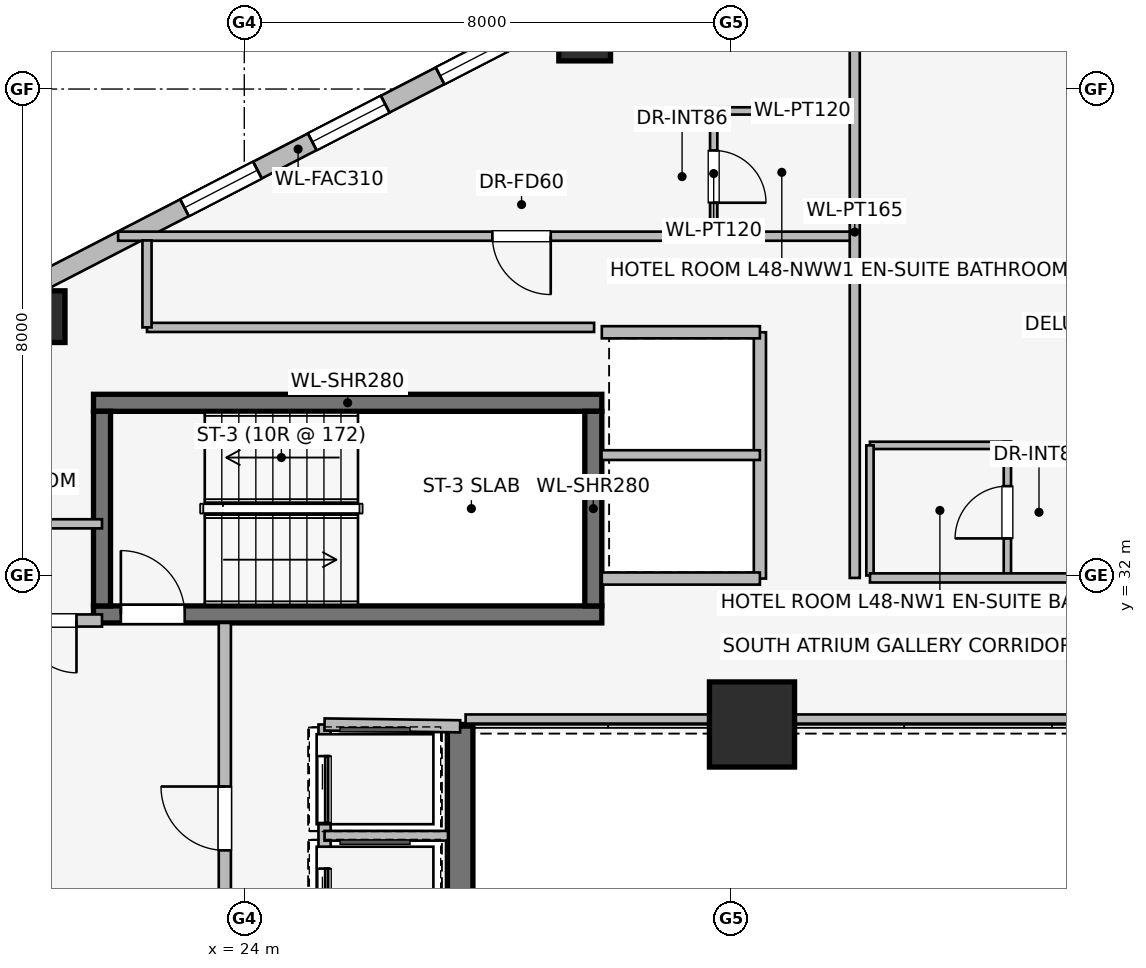
"""IFC4 building model, lengths in metres.
Left out: names, types, materials, properties, quantities, classifications, styles, units other than length and angle.
Written with IfcOpenShell. Run it as: python <this file> out.ifc"""

import sys

from ifc_helpers import new_model, si_unit, direction, frame, frame_2d, origin, origin_2d, place, context, subcontext, project, spatial, rectangle, extrude, element, fill, save


model = new_model("IFC4")
c1 = context("Model", 3, precision=1e-05, world=origin(), true_north=direction((0.0, 1.0)))
c2 = subcontext(c1, "Body", "Model", "MODEL_VIEW")
j1 = project(units=[si_unit("LENGTHUNIT", "METRE"), si_unit("PLANEANGLEUNIT", "RADIAN")], contexts=[c1])
p1 = place(None, origin())
s1 = spatial("IfcSite", under=j1, at=p1, CompositionType="ELEMENT")
p2 = place(p1, origin())
s2 = spatial("IfcBuilding", under=s1, at=p2, CompositionType="ELEMENT")
p3 = place(p2, frame((0.0, 0.0, 177.45)))
s3 = spatial("IfcBuildingStorey", under=s2, at=p3, CompositionType="ELEMENT", Elevation=177.45)
p4 = place(p3, frame((27.55, 29.55, 0.0), z_axis=(0.0, 0.0, 1.0), x_axis=(0.0, -1.0, 0.0)))
e1 = element("IfcWall", 1, at=p4, inside=s3, PredefinedType="SHEAR", context=c2, shape_type="SweptSolid", body=[
    extrude(rectangle(XDim=11.25, YDim=0.42, at=frame_2d((5.625, 0.0))), origin(), (0.0, 0.0, 1.0), 3.45),
])
p5 = place(p3, frame((21.52, 31.36, 0.0), z_axis=(0.0, 0.0, 1.0), x_axis=(1.0, 0.0, 0.0)))
e2 = element("IfcWall", 2, at=p5, inside=s3, PredefinedType="SHEAR", context=c2, shape_type="SweptSolid", body=[
    extrude(rectangle(XDim=8.36, YDim=0.28, at=frame_2d((4.18, 0.0))), origin(), (0.0, 0.0, 1.0), 3.45),
])
p6 = place(p5, frame((0.45, 0.0, 0.0)))
e3 = element("IfcOpeningElement", 3, at=p6, cuts=e2, PredefinedType="OPENING", context=c2, shape_type="SweptSolid", body=[
    extrude(rectangle(XDim=1.05, YDim=2.0, at=frame_2d((0.525, 1.0))), frame((0.0, 0.15, 0.0), z_axis=(0.0, -1.0, 0.0), x_axis=(1.0, 0.0, 0.0)), (0.0, 0.0, 1.0), 0.3),
])
p7 = place(p3, frame((29.88, 34.84, 0.0), z_axis=(0.0, 0.0, 1.0), x_axis=(-1.0, 0.0, 0.0)))
e4 = element("IfcWall", 4, at=p7, inside=s3, PredefinedType="SHEAR", context=c2, shape_type="SweptSolid", body=[
    extrude(rectangle(XDim=8.36, YDim=0.28, at=frame_2d((4.18, 0.0))), origin(), (0.0, 0.0, 1.0), 3.45),
])
for number, where, z_axis, x_axis in (
    (5, (21.66, 34.7, 0.0), (0.0, 0.0, 1.0), (0.0, -1.0, 0.0)),
    (6, (29.74, 31.5, 0.0), (0.0, 0.0, 1.0), (0.0, 1.0, 0.0)),
):
    element("IfcWall", number, at=place(p3, frame(where, z_axis=z_axis, x_axis=x_axis)), inside=s3, PredefinedType="SHEAR", context=c2, shape_type="SweptSolid", body=[
        extrude(rectangle(XDim=3.2, YDim=0.28, at=frame_2d((1.6, 0.0))), origin(), (0.0, 0.0, 1.0), 3.45),
    ])
p8 = place(p3, frame((32.35, 29.55, 0.0), z_axis=(0.0, 0.0, 1.0), x_axis=(1.0, 0.0, 0.0)))
e7 = element("IfcColumn", 7, at=p8, inside=s3, PredefinedType="COLUMN", context=c2, shape_type="SweptSolid", body=[
    extrude(rectangle(XDim=1.4, YDim=1.4, at=origin_2d()), origin(), (0.0, 0.0, 1.0), 3.45),
])
for number, where, z_axis, x_axis in (
    (8, (29.598, 40.888, 0.0), (0.0, 0.0, 1.0), (1.0, 0.0, 0.0)),
    (9, (20.626, 36.257, 0.0), (0.0, 0.0, 1.0), (1.0, 0.0, 0.0)),
):
    element("IfcColumn", number, at=place(p3, frame(where, z_axis=z_axis, x_axis=x_axis)), inside=s3, PredefinedType="COLUMN", context=c2, shape_type="SweptSolid", body=[
        extrude(rectangle(XDim=0.85, YDim=0.85, at=origin_2d()), origin(), (0.0, 0.0, 1.0), 3.45),
    ])
p9 = place(p3, frame((36.838, 42.871, 0.0), z_axis=(0.0, 0.0, 1.0), x_axis=(0.888626188278, -0.458632202867, 0.0)))
e10 = element("IfcWall", 10, at=p9, inside=s3, PredefinedType="STANDARD", context=c2, shape_type="SweptSolid", body=[
    extrude(rectangle(XDim=16.828, YDim=0.31, at=frame_2d((8.414, 0.0))), origin(), (0.0, 0.0, 1.0), 3.16),
])
p10 = place(p9, frame((0.675, 0.0, 0.75)))
e11 = element("IfcOpeningElement", 11, at=p10, cuts=e10, PredefinedType="OPENING", context=c2, shape_type="SweptSolid", body=[
    extrude(rectangle(XDim=2.0, YDim=1.5, at=frame_2d((1.0, 0.75))), frame((0.0, 0.165, 0.0), z_axis=(0.0, -1.0, 0.0), x_axis=(1.0, 0.0, 0.0)), (0.0, 0.0, 1.0), 0.33),
])
p11 = place(p9, frame((4.196, 0.0, 0.75)))
e12 = element("IfcOpeningElement", 12, at=p11, cuts=e10, PredefinedType="OPENING", context=c2, shape_type="SweptSolid", body=[
    extrude(rectangle(XDim=1.35, YDim=1.45, at=frame_2d((0.675, 0.725))), frame((0.0, 0.165, 0.0), z_axis=(0.0, -1.0, 0.0), x_axis=(1.0, 0.0, 0.0)), (0.0, 0.0, 1.0), 0.33),
])
p12 = place(p9, frame((6.078, 0.0, 0.75)))
e13 = element("IfcOpeningElement", 13, at=p12, cuts=e10, PredefinedType="OPENING", context=c2, shape_type="SweptSolid", body=[
    extrude(rectangle(XDim=1.35, YDim=1.45, at=frame_2d((0.675, 0.725))), frame((0.0, 0.165, 0.0), z_axis=(0.0, -1.0, 0.0), x_axis=(1.0, 0.0, 0.0)), (0.0, 0.0, 1.0), 0.33),
])
p13 = place(p9, frame((9.658, 0.0, 0.75)))
e14 = element("IfcOpeningElement", 14, at=p13, cuts=e10, PredefinedType="OPENING", context=c2, shape_type="SweptSolid", body=[
    extrude(rectangle(XDim=2.0, YDim=1.5, at=frame_2d((1.0, 0.75))), frame((0.0, 0.165, 0.0), z_axis=(0.0, -1.0, 0.0), x_axis=(1.0, 0.0, 0.0)), (0.0, 0.0, 1.0), 0.33),
])
p14 = place(p9, frame((14.478, 0.0, 0.75)))
e15 = element("IfcOpeningElement", 15, at=p14, cuts=e10, PredefinedType="OPENING", context=c2, shape_type="SweptSolid", body=[
    extrude(rectangle(XDim=1.35, YDim=1.45, at=frame_2d((0.675, 0.725))), frame((0.0, 0.165, 0.0), z_axis=(0.0, -1.0, 0.0), x_axis=(1.0, 0.0, 0.0)), (0.0, 0.0, 1.0), 0.33),
])
p15 = place(p3, frame((17.408, 35.153, 0.0), z_axis=(0.0, 0.0, 1.0), x_axis=(0.888626188278, 0.458632202867, 0.0)))
e16 = element("IfcWall", 16, at=p15, inside=s3, PredefinedType="STANDARD", context=c2, shape_type="SweptSolid", body=[
    extrude(rectangle(XDim=16.828, YDim=0.31, at=frame_2d((8.414, 0.0))), origin(), (0.0, 0.0, 1.0), 3.16),
])
p16 = place(p15, frame((0.675, 0.0, 0.75)))
e17 = element("IfcOpeningElement", 17, at=p16, cuts=e16, PredefinedType="OPENING", context=c2, shape_type="SweptSolid", body=[
    extrude(rectangle(XDim=2.0, YDim=1.5, at=frame_2d((1.0, 0.75))), frame((0.0, 0.165, 0.0), z_axis=(0.0, -1.0, 0.0), x_axis=(1.0, 0.0, 0.0)), (0.0, 0.0, 1.0), 0.33),
])
p17 = place(p15, frame((6.312, 0.0, 0.75)))
e18 = element("IfcOpeningElement", 18, at=p17, cuts=e16, PredefinedType="OPENING", context=c2, shape_type="SweptSolid", body=[
    extrude(rectangle(XDim=1.35, YDim=1.45, at=frame_2d((0.675, 0.725))), frame((0.0, 0.165, 0.0), z_axis=(0.0, -1.0, 0.0), x_axis=(1.0, 0.0, 0.0)), (0.0, 0.0, 1.0), 0.33),
])
p18 = place(p15, frame((8.676, 0.0, 0.75)))
e19 = element("IfcOpeningElement", 19, at=p18, cuts=e16, PredefinedType="OPENING", context=c2, shape_type="SweptSolid", body=[
    extrude(rectangle(XDim=1.35, YDim=1.45, at=frame_2d((0.675, 0.725))), frame((0.0, 0.165, 0.0), z_axis=(0.0, -1.0, 0.0), x_axis=(1.0, 0.0, 0.0)), (0.0, 0.0, 1.0), 0.33),
])
p19 = place(p15, frame((11.041, 0.0, 0.75)))
e20 = element("IfcOpeningElement", 20, at=p19, cuts=e16, PredefinedType="OPENING", context=c2, shape_type="SweptSolid", body=[
    extrude(rectangle(XDim=1.35, YDim=1.45, at=frame_2d((0.675, 0.725))), frame((0.0, 0.165, 0.0), z_axis=(0.0, -1.0, 0.0), x_axis=(1.0, 0.0, 0.0)), (0.0, 0.0, 1.0), 0.33),
])
p20 = place(p15, frame((14.153, 0.0, 0.75)))
e21 = element("IfcOpeningElement", 21, at=p20, cuts=e16, PredefinedType="OPENING", context=c2, shape_type="SweptSolid", body=[
    extrude(rectangle(XDim=2.0, YDim=1.5, at=frame_2d((1.0, 0.75))), frame((0.0, 0.165, 0.0), z_axis=(0.0, -1.0, 0.0), x_axis=(1.0, 0.0, 0.0)), (0.0, 0.0, 1.0), 0.33),
])
p21 = place(p3, frame((23.68, 25.68, 0.0), z_axis=(0.0, 0.0, 1.0), x_axis=(0.0, 1.0, 0.0)))
e22 = element("IfcWall", 22, at=p21, inside=s3, PredefinedType="PARTITIONING", context=c2, shape_type="SweptSolid", body=[
    extrude(rectangle(XDim=5.54, YDim=0.2, at=frame_2d((2.77, 0.0))), origin(), (0.0, 0.0, 1.0), 3.16),
])
p22 = place(p21, frame((1.8, 0.0, 0.0)))
e23 = element("IfcOpeningElement", 23, at=p22, cuts=e22, PredefinedType="OPENING", context=c2, shape_type="SweptSolid", body=[
    extrude(rectangle(XDim=1.05, YDim=2.0, at=frame_2d((0.525, 1.0))), frame((0.0, 0.11, 0.0), z_axis=(0.0, -1.0, 0.0), x_axis=(1.0, 0.0, 0.0)), (0.0, 0.0, 1.0), 0.22),
])
p23 = place(p3, frame((21.66, 31.26, 0.0), z_axis=(0.0, 0.0, 1.0), x_axis=(-1.0, 0.0, 0.0)))
e24 = element("IfcWall", 24, at=p23, inside=s3, PredefinedType="PARTITIONING", context=c2, shape_type="SweptSolid", body=[
    extrude(rectangle(XDim=2.01, YDim=0.2, at=frame_2d((1.005, 0.0))), origin(), (0.0, 0.0, 1.0), 3.16),
])
p24 = place(p23, frame((0.42, 0.0, 0.0)))
e25 = element("IfcOpeningElement", 25, at=p24, cuts=e24, PredefinedType="OPENING", context=c2, shape_type="SweptSolid", body=[
    extrude(rectangle(XDim=0.86, YDim=2.0, at=frame_2d((0.43, 1.0))), frame((0.0, 0.11, 0.0), z_axis=(0.0, -1.0, 0.0), x_axis=(1.0, 0.0, 0.0)), (0.0, 0.0, 1.0), 0.22),
])
p25 = place(p3, frame((32.48, 31.95, 0.0), z_axis=(0.0, 0.0, 1.0), x_axis=(0.0, 1.0, 0.0)))
e26 = element("IfcWall", 26, at=p25, inside=s3, PredefinedType="PARTITIONING", context=c2, shape_type="SweptSolid", body=[
    extrude(rectangle(XDim=4.05, YDim=0.2, at=frame_2d((2.025, 0.0))), origin(), (0.0, 0.0, 1.0), 3.16),
])
for number, where, z_axis, x_axis in (
    (27, (29.88, 36.0, 0.0), (0.0, 0.0, 1.0), (1.0, 0.0, 0.0)),
    (28, (32.48, 31.95, 0.0), (0.0, 0.0, 1.0), (-1.0, 0.0, 0.0)),
):
    element("IfcWall", number, at=place(p3, frame(where, z_axis=z_axis, x_axis=x_axis)), inside=s3, PredefinedType="PARTITIONING", context=c2, shape_type="SweptSolid", body=[
        extrude(rectangle(XDim=2.6, YDim=0.2, at=frame_2d((1.3, 0.0))), origin(), (0.0, 0.0, 1.0), 3.16),
    ])
p26 = place(p3, frame((29.875, 33.98, 0.0), z_axis=(0.0, 0.0, 1.0), x_axis=(1.0, 0.0, 0.0)))
e29 = element("IfcWall", 29, at=p26, inside=s3, PredefinedType="PARTITIONING", context=c2, shape_type="SweptSolid", body=[
    extrude(rectangle(XDim=2.605, YDim=0.16, at=frame_2d((1.302, 0.0))), origin(), (0.0, 0.0, 1.0), 3.16),
])
p27 = place(p3, frame((25.32, 29.55, 0.0), z_axis=(0.0, 0.0, 1.0), x_axis=(0.0, -1.0, 0.0)))
e30 = element("IfcWall", 30, at=p27, inside=s3, PredefinedType="PARTITIONING", context=c2, shape_type="SweptSolid", body=[
    extrude(rectangle(XDim=5.53, YDim=0.2, at=frame_2d((2.765, 0.0))), origin(), (0.0, 0.0, 1.0), 3.16),
])
p28 = place(p27, frame((0.52, 0.0, 0.0)))
e31 = element("IfcOpeningElement", 31, at=p28, cuts=e30, PredefinedType="OPENING", context=c2, shape_type="SweptSolid", body=[
    extrude(rectangle(XDim=1.1, YDim=2.2, at=frame_2d((0.55, 1.1))), frame((0.0, 0.11, 0.0), z_axis=(0.0, -1.0, 0.0), x_axis=(1.0, 0.0, 0.0)), (0.0, 0.0, 1.0), 0.22),
])
p29 = place(p27, frame((2.37, 0.0, 0.0)))
e32 = element("IfcOpeningElement", 32, at=p29, cuts=e30, PredefinedType="OPENING", context=c2, shape_type="SweptSolid", body=[
    extrude(rectangle(XDim=1.1, YDim=2.2, at=frame_2d((0.55, 1.1))), frame((0.0, 0.11, 0.0), z_axis=(0.0, -1.0, 0.0), x_axis=(1.0, 0.0, 0.0)), (0.0, 0.0, 1.0), 0.22),
])
p30 = place(p27, frame((4.07, 0.0, 0.0)))
e33 = element("IfcOpeningElement", 33, at=p30, cuts=e30, PredefinedType="OPENING", context=c2, shape_type="SweptSolid", body=[
    extrude(rectangle(XDim=1.1, YDim=2.2, at=frame_2d((0.55, 1.1))), frame((0.0, 0.11, 0.0), z_axis=(0.0, -1.0, 0.0), x_axis=(1.0, 0.0, 0.0)), (0.0, 0.0, 1.0), 0.22),
])
p31 = place(p3, frame((27.55, 29.52, 0.0), z_axis=(0.0, 0.0, 1.0), x_axis=(-0.999909343457, 0.013464949556, 0.0)))
e34 = element("IfcWall", 34, at=p31, inside=s3, PredefinedType="PARTITIONING", context=c2, shape_type="SweptSolid", body=[
    extrude(rectangle(XDim=2.23, YDim=0.2, at=frame_2d((1.115, 0.0))), origin(), (0.0, 0.0, 1.0), 2.06),
])
p32 = place(p3, frame((25.32, 27.72, 0.0), z_axis=(0.0, 0.0, 1.0), x_axis=(1.0, 0.0, 0.0)))
e35 = element("IfcWall", 35, at=p32, inside=s3, PredefinedType="PARTITIONING", context=c2, shape_type="SweptSolid", body=[
    extrude(rectangle(XDim=2.03, YDim=0.16, at=frame_2d((1.015, 0.0))), origin(), (0.0, 0.0, 1.0), 3.16),
])
p33 = place(p3, frame((21.66, 32.85, 0.0), z_axis=(0.0, 0.0, 1.0), x_axis=(-1.0, 0.0, 0.0)))
e36 = element("IfcWall", 36, at=p33, inside=s3, PredefinedType="PARTITIONING", context=c2, shape_type="SweptSolid", body=[
    extrude(rectangle(XDim=1.71, YDim=0.15, at=frame_2d((0.855, 0.0))), origin(), (0.0, 0.0, 1.0), 3.16),
])
p34 = place(p3, frame((39.84, 29.64, 0.0), z_axis=(0.0, 0.0, 1.0), x_axis=(-1.0, 0.0, 0.0)))
e37 = element("IfcWall", 37, at=p34, inside=s3, PredefinedType="PARTITIONING", context=c2, shape_type="SweptSolid", body=[
    extrude(rectangle(XDim=12.2, YDim=0.15, at=frame_2d((6.1, 0.0))), origin(), (0.0, 0.0, 1.0), 2.301),
])
p35 = place(p3, frame((34.0, 39.64, 0.0), z_axis=(0.0, 0.0, 1.0), x_axis=(-1.0, 0.0, 0.0)))
e38 = element("IfcWall", 38, at=p35, inside=s3, PredefinedType="PARTITIONING", context=c2, shape_type="SweptSolid", body=[
    extrude(rectangle(XDim=2.34, YDim=0.12, at=frame_2d((1.17, 0.0))), origin(), (0.0, 0.0, 1.0), 3.16),
])
p36 = place(p3, frame((31.72, 39.64, 0.0), z_axis=(0.0, 0.0, 1.0), x_axis=(0.0, -1.0, 0.0)))
e39 = element("IfcWall", 39, at=p36, inside=s3, PredefinedType="PARTITIONING", context=c2, shape_type="SweptSolid", body=[
    extrude(rectangle(XDim=2.06, YDim=0.12, at=frame_2d((1.03, 0.0))), origin(), (0.0, 0.0, 1.0), 3.16),
])
p37 = place(p36, frame((0.65, 0.0, 0.0)))
e40 = element("IfcOpeningElement", 40, at=p37, cuts=e39, PredefinedType="OPENING", context=c2, shape_type="SweptSolid", body=[
    extrude(rectangle(XDim=0.86, YDim=2.0, at=frame_2d((0.43, 1.0))), frame((0.0, 0.07, 0.0), z_axis=(0.0, -1.0, 0.0), x_axis=(1.0, 0.0, 0.0)), (0.0, 0.0, 1.0), 0.14),
])
p38 = place(p3, frame((34.0, 37.58, 0.0), z_axis=(0.0, 0.0, 1.0), x_axis=(-1.0, 0.0, 0.0)))
e41 = element("IfcWall", 41, at=p38, inside=s3, PredefinedType="PARTITIONING", context=c2, shape_type="SweptSolid", body=[
    extrude(rectangle(XDim=12.075, YDim=0.15, at=frame_2d((6.038, 0.0))), origin(), (0.0, 0.0, 1.0), 3.16),
])
p39 = place(p38, frame((4.96, 0.0, 0.0)))
e42 = element("IfcOpeningElement", 42, at=p39, cuts=e41, PredefinedType="OPENING", context=c2, shape_type="SweptSolid", body=[
    extrude(rectangle(XDim=0.96, YDim=2.0, at=frame_2d((0.48, 1.0))), frame((0.0, 0.085, 0.0), z_axis=(0.0, -1.0, 0.0), x_axis=(1.0, 0.0, 0.0)), (0.0, 0.0, 1.0), 0.17),
])
p40 = place(p3, frame((34.04, 31.96, 0.0), z_axis=(0.0, 0.0, 1.0), x_axis=(0.0, 1.0, 0.0)))
e43 = element("IfcWall", 43, at=p40, inside=s3, PredefinedType="PARTITIONING", context=c2, shape_type="SweptSolid", body=[
    extrude(rectangle(XDim=11.376, YDim=0.165, at=frame_2d((5.688, 0.0))), origin(), (0.0, 0.0, 1.0), 3.16),
])
p41 = place(p3, frame((36.55, 31.96, 0.0), z_axis=(0.0, 0.0, 1.0), x_axis=(0.0, 1.0, 0.0)))
e44 = element("IfcWall", 44, at=p41, inside=s3, PredefinedType="PARTITIONING", context=c2, shape_type="SweptSolid", body=[
    extrude(rectangle(XDim=2.24, YDim=0.12, at=frame_2d((1.12, 0.0))), origin(), (0.0, 0.0, 1.0), 3.16),
])
p42 = place(p41, frame((0.65, 0.0, 0.0)))
e45 = element("IfcOpeningElement", 45, at=p42, cuts=e44, PredefinedType="OPENING", context=c2, shape_type="SweptSolid", body=[
    extrude(rectangle(XDim=0.86, YDim=2.0, at=frame_2d((0.43, 1.0))), frame((0.0, 0.07, 0.0), z_axis=(0.0, -1.0, 0.0), x_axis=(1.0, 0.0, 0.0)), (0.0, 0.0, 1.0), 0.14),
])
p43 = place(p3, frame((36.61, 34.14, 0.0), z_axis=(0.0, 0.0, 1.0), x_axis=(-1.0, 0.0, 0.0)))
e46 = element("IfcWall", 46, at=p43, inside=s3, PredefinedType="PARTITIONING", context=c2, shape_type="SweptSolid", body=[
    extrude(rectangle(XDim=2.32, YDim=0.12, at=frame_2d((1.16, 0.0))), origin(), (0.0, 0.0, 1.0), 3.16),
])
p44 = place(p3, frame((34.29, 34.14, 0.0), z_axis=(0.0, 0.0, 1.0), x_axis=(0.0, -1.0, 0.0)))
e47 = element("IfcWall", 47, at=p44, inside=s3, PredefinedType="PARTITIONING", context=c2, shape_type="SweptSolid", body=[
    extrude(rectangle(XDim=2.14, YDim=0.12, at=frame_2d((1.07, 0.0))), origin(), (0.0, 0.0, 1.0), 3.16),
])
p45 = place(p3, frame((43.985, 31.96, 0.0), z_axis=(0.0, 0.0, 1.0), x_axis=(-1.0, 0.0, 0.0)))
e48 = element("IfcWall", 48, at=p45, inside=s3, PredefinedType="PARTITIONING", context=c2, shape_type="SweptSolid", body=[
    extrude(rectangle(XDim=9.695, YDim=0.15, at=frame_2d((4.848, 0.0))), origin(), (0.0, 0.0, 1.0), 3.16),
])
p46 = place(p45, frame((3.148, 0.0, 0.0)))
e49 = element("IfcOpeningElement", 49, at=p46, cuts=e48, PredefinedType="OPENING", context=c2, shape_type="SweptSolid", body=[
    extrude(rectangle(XDim=0.96, YDim=2.0, at=frame_2d((0.48, 1.0))), frame((0.0, 0.085, 0.0), z_axis=(0.0, -1.0, 0.0), x_axis=(1.0, 0.0, 0.0)), (0.0, 0.0, 1.0), 0.17),
])
p47 = place(p3, frame((29.753, 36.08, 0.0), z_axis=(0.0, 0.0, 1.0), x_axis=(-1.0, 0.0, 0.0)))
e50 = element("IfcWall", 50, at=p47, inside=s3, PredefinedType="PARTITIONING", context=c2, shape_type="SweptSolid", body=[
    extrude(rectangle(XDim=7.353, YDim=0.15, at=frame_2d((3.677, 0.0))), origin(), (0.0, 0.0, 1.0), 3.16),
])
p48 = place(p3, frame((22.4, 36.08, 0.0), z_axis=(0.0, 0.0, 1.0), x_axis=(0.0, 1.0, 0.0)))
e51 = element("IfcWall", 51, at=p48, inside=s3, PredefinedType="PARTITIONING", context=c2, shape_type="SweptSolid", body=[
    extrude(rectangle(XDim=1.43, YDim=0.15, at=frame_2d((0.715, 0.0))), origin(), (0.0, 0.0, 1.0), 3.16),
])
p49 = place(p17, origin())
e52 = element("IfcWindow", 52, at=p49, inside=s3, PartitioningType="SINGLE_PANEL", PredefinedType="WINDOW", context=c2, shape_type="SweptSolid", body=[
    extrude(rectangle(XDim=1.35, YDim=1.45, at=frame_2d((0.675, 0.725))), frame((0.0, 0.03, 0.0), z_axis=(0.0, -1.0, 0.0), x_axis=(1.0, 0.0, 0.0)), (0.0, 0.0, 1.0), 0.06),
])
fill(e18, e52)
p50 = place(p18, origin())
e53 = element("IfcWindow", 53, at=p50, inside=s3, PartitioningType="SINGLE_PANEL", PredefinedType="WINDOW", context=c2, shape_type="SweptSolid", body=[
    extrude(rectangle(XDim=1.35, YDim=1.45, at=frame_2d((0.675, 0.725))), frame((0.0, 0.03, 0.0), z_axis=(0.0, -1.0, 0.0), x_axis=(1.0, 0.0, 0.0)), (0.0, 0.0, 1.0), 0.06),
])
fill(e19, e53)
p51 = place(p19, origin())
e54 = element("IfcWindow", 54, at=p51, inside=s3, PartitioningType="SINGLE_PANEL", PredefinedType="WINDOW", context=c2, shape_type="SweptSolid", body=[
    extrude(rectangle(XDim=1.35, YDim=1.45, at=frame_2d((0.675, 0.725))), frame((0.0, 0.03, 0.0), z_axis=(0.0, -1.0, 0.0), x_axis=(1.0, 0.0, 0.0)), (0.0, 0.0, 1.0), 0.06),
])
fill(e20, e54)
p52 = place(p6, origin())
e55 = element("IfcDoor", 55, at=p52, inside=s3, OperationType="SINGLE_SWING_LEFT", PredefinedType="DOOR", context=c2, shape_type="SweptSolid", body=[
    extrude(rectangle(XDim=1.05, YDim=2.0, at=frame_2d((0.525, 1.0))), frame((0.0, 0.025, 0.0), z_axis=(0.0, -1.0, 0.0), x_axis=(1.0, 0.0, 0.0)), (0.0, 0.0, 1.0), 0.05),
])
fill(e3, e55)
p53 = place(p22, origin())
e56 = element("IfcDoor", 56, at=p53, inside=s3, OperationType="SINGLE_SWING_RIGHT", PredefinedType="DOOR", context=c2, shape_type="SweptSolid", body=[
    extrude(rectangle(XDim=1.05, YDim=2.0, at=frame_2d((0.525, 1.0))), frame((0.0, 0.025, 0.0), z_axis=(0.0, -1.0, 0.0), x_axis=(1.0, 0.0, 0.0)), (0.0, 0.0, 1.0), 0.05),
])
fill(e23, e56)
p54 = place(p24, origin())
e57 = element("IfcDoor", 57, at=p54, inside=s3, OperationType="SINGLE_SWING_LEFT", PredefinedType="DOOR", context=c2, shape_type="SweptSolid", body=[
    extrude(rectangle(XDim=0.86, YDim=2.0, at=frame_2d((0.43, 1.0))), frame((0.0, 0.025, 0.0), z_axis=(0.0, -1.0, 0.0), x_axis=(1.0, 0.0, 0.0)), (0.0, 0.0, 1.0), 0.05),
])
fill(e25, e57)
p55 = place(p28, origin())
e58 = element("IfcDoor", 58, at=p55, inside=s3, OperationType="SLIDING_TO_LEFT", PredefinedType="DOOR", context=c2, shape_type="SweptSolid", body=[
    extrude(rectangle(XDim=1.1, YDim=2.2, at=frame_2d((0.55, 1.1))), frame((0.0, 0.025, 0.0), z_axis=(0.0, -1.0, 0.0), x_axis=(1.0, 0.0, 0.0)), (0.0, 0.0, 1.0), 0.05),
])
fill(e31, e58)
p56 = place(p29, origin())
e59 = element("IfcDoor", 59, at=p56, inside=s3, OperationType="SLIDING_TO_LEFT", PredefinedType="DOOR", context=c2, shape_type="SweptSolid", body=[
    extrude(rectangle(XDim=1.1, YDim=2.2, at=frame_2d((0.55, 1.1))), frame((0.0, 0.025, 0.0), z_axis=(0.0, -1.0, 0.0), x_axis=(1.0, 0.0, 0.0)), (0.0, 0.0, 1.0), 0.05),
])
fill(e32, e59)
p57 = place(p37, origin())
e60 = element("IfcDoor", 60, at=p57, inside=s3, OperationType="SINGLE_SWING_RIGHT", PredefinedType="DOOR", context=c2, shape_type="SweptSolid", body=[
    extrude(rectangle(XDim=0.86, YDim=2.0, at=frame_2d((0.43, 1.0))), frame((0.0, 0.025, 0.0), z_axis=(0.0, -1.0, 0.0), x_axis=(1.0, 0.0, 0.0)), (0.0, 0.0, 1.0), 0.05),
])
fill(e40, e60)
p58 = place(p39, origin())
e61 = element("IfcDoor", 61, at=p58, inside=s3, OperationType="SINGLE_SWING_LEFT", PredefinedType="DOOR", context=c2, shape_type="SweptSolid", body=[
    extrude(rectangle(XDim=0.96, YDim=2.0, at=frame_2d((0.48, 1.0))), frame((0.0, 0.025, 0.0), z_axis=(0.0, -1.0, 0.0), x_axis=(1.0, 0.0, 0.0)), (0.0, 0.0, 1.0), 0.05),
])
fill(e42, e61)
p59 = place(p42, origin())
e62 = element("IfcDoor", 62, at=p59, inside=s3, OperationType="SINGLE_SWING_LEFT", PredefinedType="DOOR", context=c2, shape_type="SweptSolid", body=[
    extrude(rectangle(XDim=0.86, YDim=2.0, at=frame_2d((0.43, 1.0))), frame((0.0, 0.025, 0.0), z_axis=(0.0, -1.0, 0.0), x_axis=(1.0, 0.0, 0.0)), (0.0, 0.0, 1.0), 0.05),
])
fill(e45, e62)
save(model, sys.argv[1])
